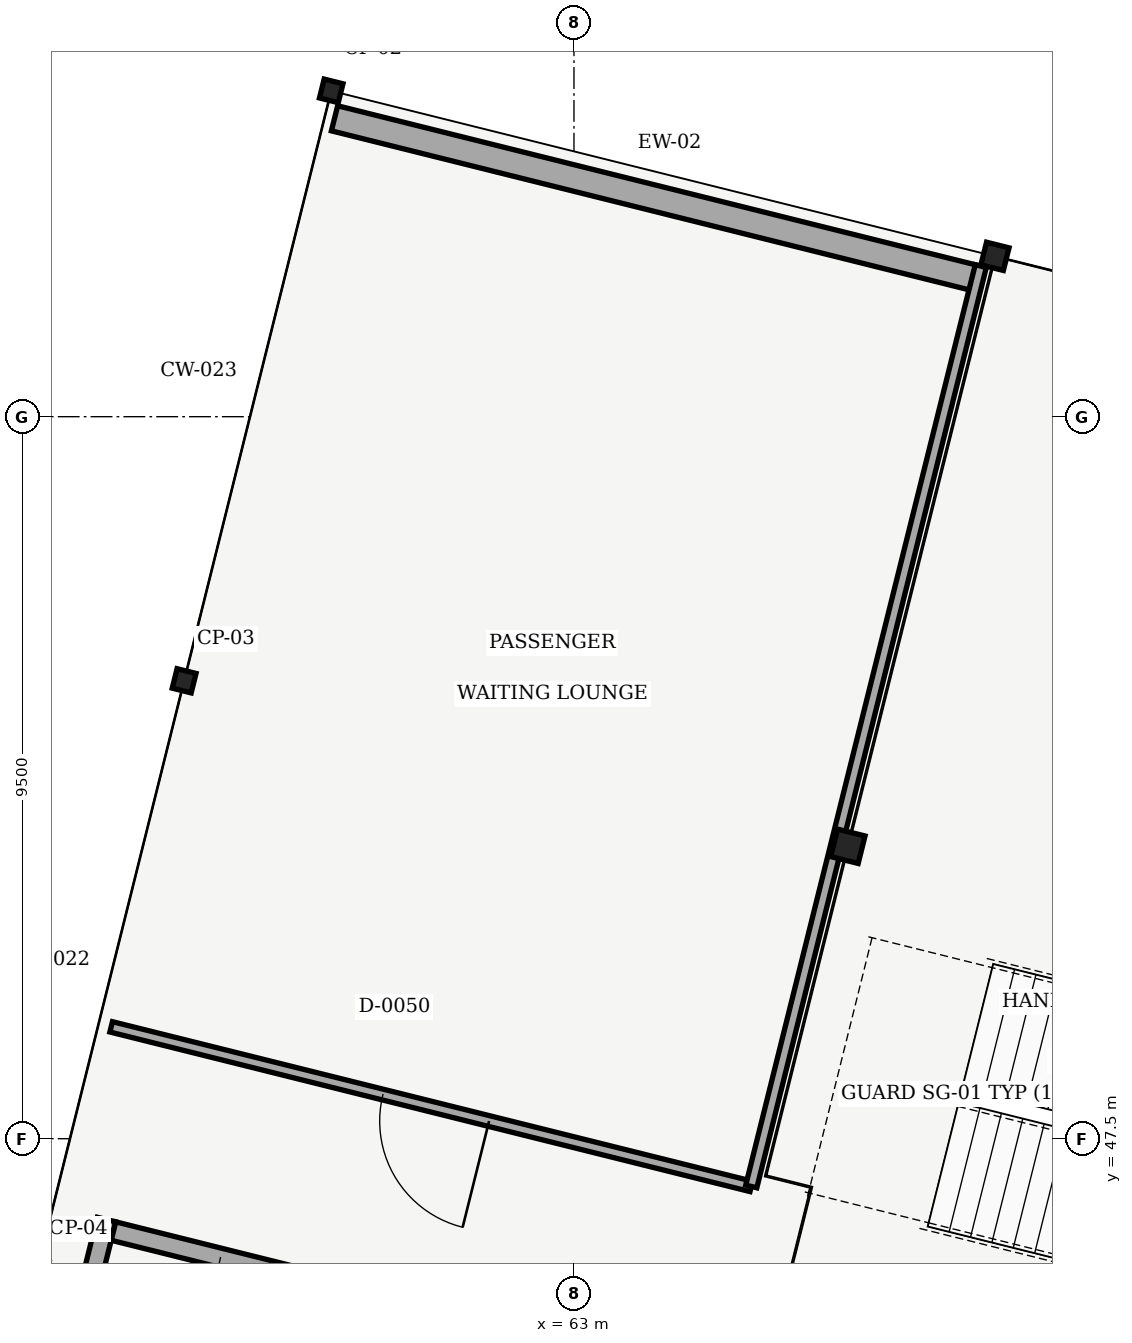
"""IFC4 building model, lengths in metres.
Left out: names, types, materials, properties, quantities, classifications, styles, units other than length and angle.
Written with IfcOpenShell. Run it as: python <this file> out.ifc"""

import sys

from ifc_helpers import new_model, si_unit, direction, frame, frame_2d, origin, origin_with_axes, origin_2d, place, context, subcontext, project, spatial, rectangle, i_section, extrude, element, fill, save


model = new_model("IFC4")
c1 = context("Model", 3, precision=1e-05, world=origin(), true_north=direction((0.0, 1.0)))
c2 = subcontext(c1, "Body", "Model", "MODEL_VIEW")
j1 = project(units=[si_unit("LENGTHUNIT", "METRE"), si_unit("PLANEANGLEUNIT", "RADIAN")], contexts=[c1])
p1 = place(None, origin())
s1 = spatial("IfcSite", under=j1, at=p1, CompositionType="ELEMENT")
p2 = place(p1, origin())
s2 = spatial("IfcBuilding", under=s1, at=p2, CompositionType="ELEMENT")
p3 = place(p2, frame((0.0, 0.0, 14.4)))
s3 = spatial("IfcBuildingStorey", under=s2, at=p3, CompositionType="ELEMENT", Elevation=14.4)
p4 = place(p3, frame((57.871, 53.525, 0.0), z_axis=(0.0, 0.0, 1.0), x_axis=(0.970295726276, -0.2419218956, 0.0)))
e1 = element("IfcColumn", 1, at=p4, inside=s3, PredefinedType="PILASTER", context=c2, shape_type="SweptSolid", body=[
    extrude(i_section(OverallWidth=0.257, OverallDepth=0.264, WebThickness=0.012, FlangeThickness=0.02, FilletRadius=0.009, at=origin_2d()), origin(), (0.0, 0.0, 1.0), 4.8),
])
p5 = place(p3, frame((59.806, 61.287, 0.0), z_axis=(0.0, 0.0, 1.0), x_axis=(0.970295726276, -0.2419218956, 0.0)))
e2 = element("IfcColumn", 2, at=p5, inside=s3, PredefinedType="PILASTER", context=c2, shape_type="SweptSolid", body=[
    extrude(i_section(OverallWidth=0.255, OverallDepth=0.256, WebThickness=0.01, FlangeThickness=0.016, FilletRadius=0.009, at=origin_2d()), origin(), (0.0, 0.0, 1.0), 4.8),
])
p6 = place(p3, frame((66.604, 51.347, 0.0), z_axis=(0.0, 0.0, 1.0), x_axis=(0.970295726276, -0.2419218956, 0.0)))
e3 = element("IfcColumn", 3, at=p6, inside=s3, PredefinedType="COLUMN", context=c2, shape_type="SweptSolid", body=[
    extrude(i_section(OverallWidth=0.373, OverallDepth=0.373, WebThickness=0.016, FlangeThickness=0.026, FilletRadius=0.015, at=origin_2d()), origin(), (0.0, 0.0, 1.0), 4.8),
])
p7 = place(p3, frame((68.539, 59.11, 0.0), z_axis=(0.0, 0.0, 1.0), x_axis=(0.970295726276, -0.2419218956, 0.0)))
e4 = element("IfcColumn", 4, at=p7, inside=s3, PredefinedType="COLUMN", context=c2, shape_type="SweptSolid", body=[
    extrude(i_section(OverallWidth=0.305, OverallDepth=0.307, WebThickness=0.01, FlangeThickness=0.015, FilletRadius=0.013, at=origin_2d()), origin(), (0.0, 0.0, 1.0), 4.8),
])
p8 = place(p3, frame((59.85, 60.926, 0.0), z_axis=(0.0, 0.0, 1.0), x_axis=(0.970300473491, -0.241902854765, 0.0)))
e5 = element("IfcWall", 5, at=p8, inside=s3, PredefinedType="SOLIDWALL", context=c2, shape_type="SweptSolid", body=[
    extrude(rectangle(XDim=8.716, YDim=0.34, at=frame_2d((4.358, 0.0))), origin(), (0.0, 0.0, 1.0), 3.4),
])
p9 = place(p3, frame((54.81, 38.251, 0.0), z_axis=(0.0, 0.0, 1.0), x_axis=(0.24193628408, 0.970292138712, 0.0)))
e6 = element("IfcWall", 6, at=p9, inside=s3, PredefinedType="SHEAR", context=c2, shape_type="SweptSolid", body=[
    extrude(rectangle(XDim=8.435, YDim=0.25, at=frame_2d((4.218, 0.0))), origin(), (0.0, 0.0, 1.0), 4.54),
])
p10 = place(p3, frame((64.267, 44.458, 0.0), z_axis=(0.0, 0.0, 1.0), x_axis=(-0.97029827707, 0.241911664693, 0.0)))
e7 = element("IfcWall", 7, at=p10, inside=s3, PredefinedType="SHEAR", context=c2, shape_type="SweptSolid", body=[
    extrude(rectangle(XDim=7.55, YDim=0.25, at=frame_2d((3.775, 0.0))), origin(), (0.0, 0.0, 1.0), 4.54),
])
p11 = place(p10, frame((4.8, 0.0, 0.0)))
e8 = element("IfcOpeningElement", 8, at=p11, cuts=e7, PredefinedType="OPENING", context=c2, shape_type="SweptSolid", body=[
    extrude(rectangle(XDim=1.3, YDim=2.15, at=frame_2d((0.65, 1.075))), frame((0.0, 0.135, 0.0), z_axis=(0.0, -1.0, 0.0), x_axis=(1.0, 0.0, 0.0)), (0.0, 0.0, 1.0), 0.27),
])
p12 = place(p3, frame((65.333, 46.872, 0.0), z_axis=(0.0, 0.0, 1.0), x_axis=(-0.970297822064, 0.241913489697, 0.0)))
e9 = element("IfcWall", 9, at=p12, inside=s3, PredefinedType="PARTITIONING", context=c2, shape_type="SweptSolid", body=[
    extrude(rectangle(XDim=8.68, YDim=0.14, at=frame_2d((4.34, 0.0))), origin(), (0.0, 0.0, 1.0), 3.38),
])
p13 = place(p12, frame((3.555, 0.0, 0.0)))
e10 = element("IfcOpeningElement", 10, at=p13, cuts=e9, PredefinedType="OPENING", context=c2, shape_type="SweptSolid", body=[
    extrude(rectangle(XDim=1.44, YDim=2.22, at=frame_2d((0.72, 1.11))), frame((0.0, 0.08, 0.0), z_axis=(0.0, -1.0, 0.0), x_axis=(1.0, 0.0, 0.0)), (0.0, 0.0, 1.0), 0.16),
])
p14 = place(p3, frame((68.352, 58.981, 0.0), z_axis=(0.0, 0.0, 1.0), x_axis=(-0.24190957532, -0.970298797984, 0.0)))
e11 = element("IfcWall", 11, at=p14, inside=s3, PredefinedType="PARTITIONING", context=c2, shape_type="SweptSolid", body=[
    extrude(rectangle(XDim=12.48, YDim=0.15, at=frame_2d((6.24, 0.0))), origin(), (0.0, 0.0, 1.0), 3.38),
])
p15 = place(p11, origin_with_axes())
e12 = element("IfcDoor", 12, at=p15, inside=s3, OperationType="SINGLE_SWING_LEFT", PredefinedType="DOOR", context=c2, shape_type="SweptSolid", body=[
    extrude(rectangle(XDim=1.3, YDim=2.15, at=frame_2d((0.65, 1.075))), frame((0.0, 0.025, 0.0), z_axis=(0.0, -1.0, 0.0), x_axis=(1.0, 0.0, 0.0)), (0.0, 0.0, 1.0), 0.05),
])
fill(e8, e12)
p16 = place(p13, origin_with_axes())
e13 = element("IfcDoor", 13, at=p16, inside=s3, OperationType="SINGLE_SWING_LEFT", PredefinedType="DOOR", context=c2, shape_type="SweptSolid", body=[
    extrude(rectangle(XDim=1.44, YDim=2.22, at=frame_2d((0.72, 1.11))), frame((0.0, 0.025, 0.0), z_axis=(0.0, -1.0, 0.0), x_axis=(1.0, 0.0, 0.0)), (0.0, 0.0, 1.0), 0.05),
])
fill(e10, e13)
save(model, sys.argv[1])
